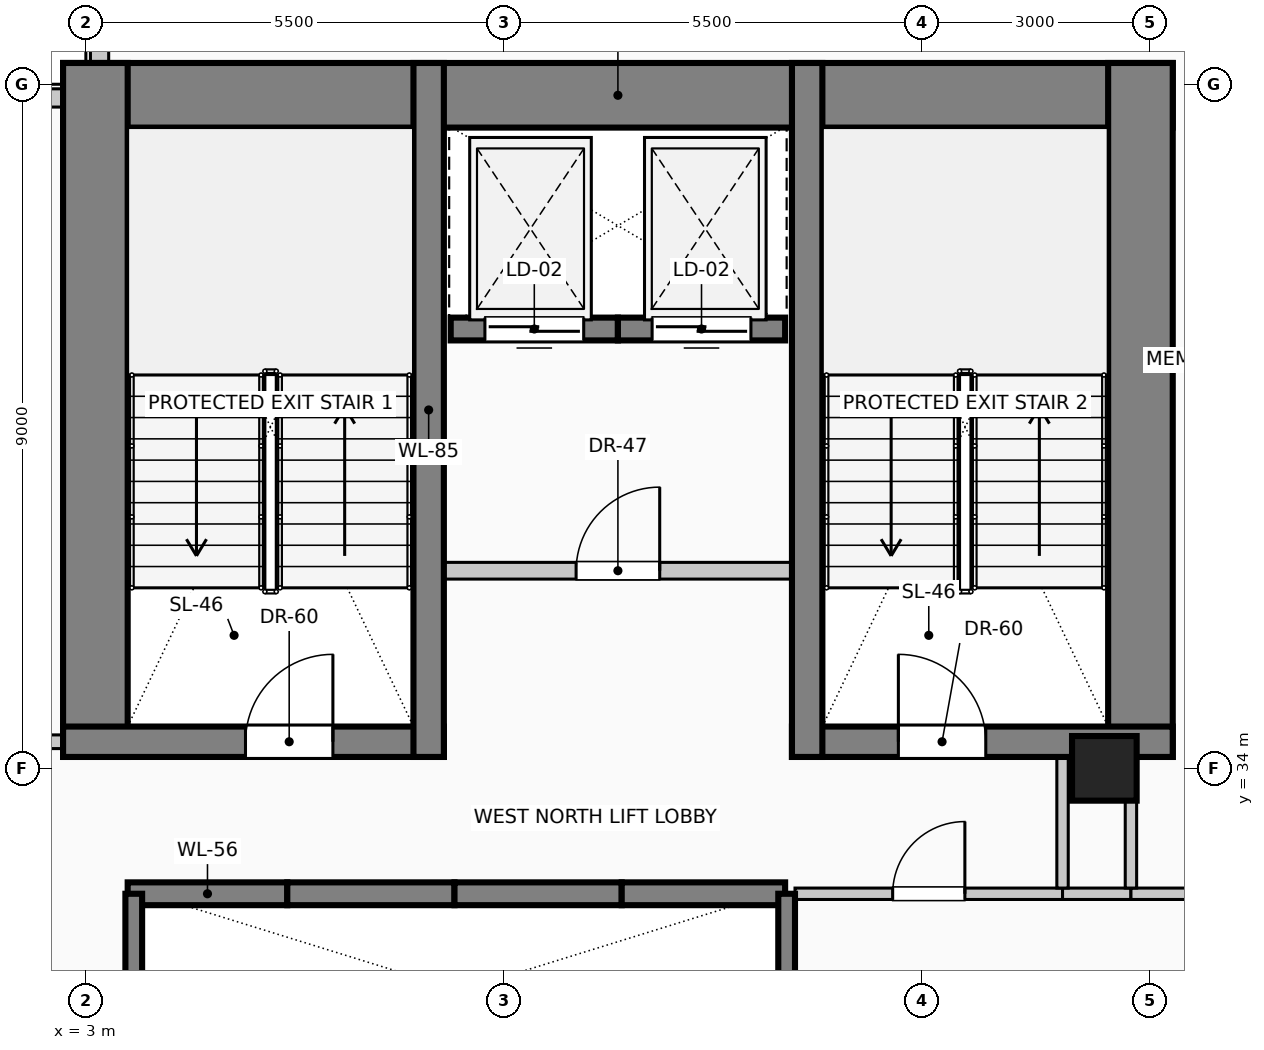
"""IFC4 building model, lengths in metres.
Left out: names, types, materials, properties, quantities, classifications, styles, units other than length and angle.
Written with IfcOpenShell. Run it as: python <this file> out.ifc"""

import sys

from ifc_helpers import new_model, si_unit, direction, frame, frame_2d, origin, origin_2d, place, context, subcontext, project, spatial, rectangle, circle, extrude, element, fill, save


model = new_model("IFC4")
c1 = context("Model", 3, precision=1e-05, world=origin(), true_north=direction((0.0, 1.0)))
c2 = subcontext(c1, "Body", "Model", "MODEL_VIEW")
j1 = project(units=[si_unit("LENGTHUNIT", "METRE"), si_unit("PLANEANGLEUNIT", "RADIAN")], contexts=[c1])
p1 = place(None, origin())
s1 = spatial("IfcSite", under=j1, at=p1, CompositionType="ELEMENT")
p2 = place(p1, origin())
s2 = spatial("IfcBuilding", under=s1, at=p2, CompositionType="ELEMENT")
p3 = place(p2, frame((0.0, 0.0, 178.6)))
s3 = spatial("IfcBuildingStorey", under=s2, at=p3, CompositionType="ELEMENT", Elevation=178.6)
p4 = place(p3, frame((2.7, 42.855, 0.0), z_axis=(0.0, 0.0, 1.0), x_axis=(1.0, 0.0, 0.0)))
e1 = element("IfcWall", 1, at=p4, inside=s3, PredefinedType="SHEAR", context=c2, shape_type="SweptSolid", body=[
    extrude(rectangle(XDim=14.6, YDim=0.85, at=frame_2d((7.3, 0.0))), origin(), (0.0, 0.0, 1.0), 4.0),
])
for number, where, z_axis, x_axis in (
    (2, (3.125, 34.15, 0.0), (0.0, 0.0, 1.0), (0.0, 1.0, 0.0)),
    (3, (16.875, 34.15, 0.0), (0.0, 0.0, 1.0), (0.0, 1.0, 0.0)),
):
    element("IfcWall", number, at=place(p3, frame(where, z_axis=z_axis, x_axis=x_axis)), inside=s3, PredefinedType="SHEAR", context=c2, shape_type="SweptSolid", body=[
        extrude(rectangle(XDim=9.13, YDim=0.85, at=frame_2d((4.565, 0.0))), origin(), (0.0, 0.0, 1.0), 4.0),
    ])
p5 = place(p3, frame((2.7, 34.35, 0.0), z_axis=(0.0, 0.0, 1.0), x_axis=(1.0, 0.0, 0.0)))
e4 = element("IfcWall", 4, at=p5, inside=s3, PredefinedType="SHEAR", context=c2, shape_type="SweptSolid", body=[
    extrude(rectangle(XDim=5.01, YDim=0.4, at=frame_2d((2.505, 0.0))), origin(), (0.0, 0.0, 1.0), 4.0),
])
p6 = place(p5, frame((2.4, 0.0, 0.0)))
e5 = element("IfcOpeningElement", 5, at=p6, cuts=e4, PredefinedType="OPENING", context=c2, shape_type="SweptSolid", body=[
    extrude(rectangle(XDim=1.15, YDim=2.2, at=frame_2d((0.575, 1.1))), frame((0.0, 0.21, 0.0), z_axis=(0.0, -1.0, 0.0), x_axis=(1.0, 0.0, 0.0)), (0.0, 0.0, 1.0), 0.42),
])
p7 = place(p3, frame((12.29, 34.35, 0.0), z_axis=(0.0, 0.0, 1.0), x_axis=(1.0, 0.0, 0.0)))
e6 = element("IfcWall", 6, at=p7, inside=s3, PredefinedType="SHEAR", context=c2, shape_type="SweptSolid", body=[
    extrude(rectangle(XDim=5.01, YDim=0.4, at=frame_2d((2.505, 0.0))), origin(), (0.0, 0.0, 1.0), 4.0),
])
p8 = place(p7, frame((1.4, 0.0, 0.0)))
e7 = element("IfcOpeningElement", 7, at=p8, cuts=e6, PredefinedType="OPENING", context=c2, shape_type="SweptSolid", body=[
    extrude(rectangle(XDim=1.15, YDim=2.2, at=frame_2d((0.575, 1.1))), frame((0.0, 0.21, 0.0), z_axis=(0.0, -1.0, 0.0), x_axis=(1.0, 0.0, 0.0)), (0.0, 0.0, 1.0), 0.42),
])
for number, where, z_axis, x_axis in (
    (8, (7.51, 34.15, 0.0), (0.0, 0.0, 1.0), (0.0, 1.0, 0.0)),
    (9, (12.49, 34.15, 0.0), (0.0, 0.0, 1.0), (0.0, 1.0, 0.0)),
):
    element("IfcWall", number, at=place(p3, frame(where, z_axis=z_axis, x_axis=x_axis)), inside=s3, PredefinedType="SHEAR", context=c2, shape_type="SweptSolid", body=[
        extrude(rectangle(XDim=9.13, YDim=0.4, at=frame_2d((4.565, 0.0))), origin(), (0.0, 0.0, 1.0), 4.0),
    ])
p9 = place(p3, frame((16.4, 34.0, 0.0), z_axis=(0.0, 0.0, 1.0), x_axis=(1.0, 0.0, 0.0)))
e10 = element("IfcColumn", 10, at=p9, inside=s3, PredefinedType="COLUMN", context=c2, shape_type="SweptSolid", body=[
    extrude(circle(Radius=0.425, at=origin_2d()), origin(), (0.0, 0.0, 1.0), 4.0),
])
p10 = place(p3, frame((0.6, 42.82, 0.0), z_axis=(0.0, 0.0, 1.0), x_axis=(1.0, 0.0, 0.0)))
e11 = element("IfcWall", 11, at=p10, inside=s3, PredefinedType="SOLIDWALL", context=c2, shape_type="SweptSolid", body=[
    extrude(rectangle(XDim=2.095, YDim=0.24, at=frame_2d((1.047, 0.0))), origin(), (0.0, 0.0, 1.0), 3.75),
])
p11 = place(p3, frame((3.18, 43.285, 0.0), z_axis=(0.0, 0.0, 1.0), x_axis=(0.0, 1.0, 0.0)))
e12 = element("IfcWall", 12, at=p11, inside=s3, PredefinedType="SOLIDWALL", context=c2, shape_type="SweptSolid", body=[
    extrude(rectangle(XDim=2.115, YDim=0.24, at=frame_2d((1.058, 0.0))), origin(), (0.0, 0.0, 1.0), 3.75),
])
p12 = place(p3, frame((3.55, 32.35, 0.0), z_axis=(0.0, 0.0, 1.0), x_axis=(1.0, 0.0, 0.0)))
e13 = element("IfcWall", 13, at=p12, inside=s3, PredefinedType="SOLIDWALL", context=c2, shape_type="SweptSolid", body=[
    extrude(rectangle(XDim=2.1, YDim=0.3, at=frame_2d((1.05, 0.0))), origin(), (0.0, 0.0, 1.0), 4.0),
])
p13 = place(p3, frame((5.65, 32.35, 0.0), z_axis=(0.0, 0.0, 1.0), x_axis=(1.0, 0.0, 0.0)))
e14 = element("IfcWall", 14, at=p13, inside=s3, PredefinedType="SOLIDWALL", context=c2, shape_type="SweptSolid", body=[
    extrude(rectangle(XDim=2.2, YDim=0.3, at=frame_2d((1.1, 0.0))), origin(), (0.0, 0.0, 1.0), 4.0),
])
p14 = place(p3, frame((7.85, 32.35, 0.0), z_axis=(0.0, 0.0, 1.0), x_axis=(1.0, 0.0, 0.0)))
e15 = element("IfcWall", 15, at=p14, inside=s3, PredefinedType="SOLIDWALL", context=c2, shape_type="SweptSolid", body=[
    extrude(rectangle(XDim=2.2, YDim=0.3, at=frame_2d((1.1, 0.0))), origin(), (0.0, 0.0, 1.0), 4.0),
])
p15 = place(p3, frame((10.05, 32.35, 0.0), z_axis=(0.0, 0.0, 1.0), x_axis=(1.0, 0.0, 0.0)))
e16 = element("IfcWall", 16, at=p15, inside=s3, PredefinedType="SOLIDWALL", context=c2, shape_type="SweptSolid", body=[
    extrude(rectangle(XDim=2.15, YDim=0.3, at=frame_2d((1.075, 0.0))), origin(), (0.0, 0.0, 1.0), 4.0),
])
p16 = place(p3, frame((10.0, 39.78, 0.0), z_axis=(0.0, 0.0, 1.0), x_axis=(-1.0, 0.0, 0.0)))
e17 = element("IfcWall", 17, at=p16, inside=s3, PredefinedType="SOLIDWALL", context=c2, shape_type="SweptSolid", body=[
    extrude(rectangle(XDim=2.2, YDim=0.3, at=frame_2d((1.1, 0.0))), origin(), (0.0, 0.0, 1.0), 4.0),
])
p17 = place(p16, frame((0.45, 0.0, 0.0)))
e18 = element("IfcOpeningElement", 18, at=p17, cuts=e17, PredefinedType="OPENING", context=c2, shape_type="SweptSolid", body=[
    extrude(rectangle(XDim=1.3, YDim=2.25, at=frame_2d((0.65, 1.125))), frame((0.0, 0.16, 0.0), z_axis=(0.0, -1.0, 0.0), x_axis=(1.0, 0.0, 0.0)), (0.0, 0.0, 1.0), 0.32),
])
p18 = place(p3, frame((12.2, 39.78, 0.0), z_axis=(0.0, 0.0, 1.0), x_axis=(-1.0, 0.0, 0.0)))
e19 = element("IfcWall", 19, at=p18, inside=s3, PredefinedType="SOLIDWALL", context=c2, shape_type="SweptSolid", body=[
    extrude(rectangle(XDim=2.2, YDim=0.3, at=frame_2d((1.1, 0.0))), origin(), (0.0, 0.0, 1.0), 4.0),
])
p19 = place(p18, frame((0.45, 0.0, 0.0)))
e20 = element("IfcOpeningElement", 20, at=p19, cuts=e19, PredefinedType="OPENING", context=c2, shape_type="SweptSolid", body=[
    extrude(rectangle(XDim=1.3, YDim=2.25, at=frame_2d((0.65, 1.125))), frame((0.0, 0.16, 0.0), z_axis=(0.0, -1.0, 0.0), x_axis=(1.0, 0.0, 0.0)), (0.0, 0.0, 1.0), 0.32),
])
p20 = place(p3, frame((3.63, 26.8, 0.0), z_axis=(0.0, 0.0, 1.0), x_axis=(0.0, 1.0, 0.0)))
e21 = element("IfcWall", 21, at=p20, inside=s3, PredefinedType="SOLIDWALL", context=c2, shape_type="SweptSolid", body=[
    extrude(rectangle(XDim=5.55, YDim=0.22, at=frame_2d((2.775, 0.0))), origin(), (0.0, 0.0, 1.0), 4.0),
])
p21 = place(p3, frame((12.22, 29.75, 0.0), z_axis=(0.0, 0.0, 1.0), x_axis=(0.0, 1.0, 0.0)))
e22 = element("IfcWall", 22, at=p21, inside=s3, PredefinedType="SOLIDWALL", context=c2, shape_type="SweptSolid", body=[
    extrude(rectangle(XDim=2.6, YDim=0.22, at=frame_2d((1.3, 0.0))), origin(), (0.0, 0.0, 1.0), 4.0),
])
p22 = place(p3, frame((7.51, 36.6, 0.0), z_axis=(0.0, 0.0, 1.0), x_axis=(1.0, 0.0, 0.0)))
e23 = element("IfcWall", 23, at=p22, inside=s3, PredefinedType="PARTITIONING", context=c2, shape_type="SweptSolid", body=[
    extrude(rectangle(XDim=4.98, YDim=0.22, at=frame_2d((2.49, 0.0))), origin(), (0.0, 0.0, 1.0), 3.75),
])
p23 = place(p22, frame((1.94, 0.0, 0.0)))
e24 = element("IfcOpeningElement", 24, at=p23, cuts=e23, PredefinedType="OPENING", context=c2, shape_type="SweptSolid", body=[
    extrude(rectangle(XDim=1.1, YDim=2.2, at=frame_2d((0.55, 1.1))), frame((0.0, 0.12, 0.0), z_axis=(0.0, -1.0, 0.0), x_axis=(1.0, 0.0, 0.0)), (0.0, 0.0, 1.0), 0.24),
])
p24 = place(p3, frame((12.33, 32.35, 0.0), z_axis=(0.0, 0.0, 1.0), x_axis=(1.0, 0.0, 0.0)))
e25 = element("IfcWall", 25, at=p24, inside=s3, PredefinedType="PARTITIONING", context=c2, shape_type="SweptSolid", body=[
    extrude(rectangle(XDim=3.52, YDim=0.15, at=frame_2d((1.76, 0.0))), origin(), (0.0, 0.0, 1.0), 3.75),
])
p25 = place(p24, frame((1.285, 0.0, 0.0)))
e26 = element("IfcOpeningElement", 26, at=p25, cuts=e25, PredefinedType="OPENING", context=c2, shape_type="SweptSolid", body=[
    extrude(rectangle(XDim=0.95, YDim=2.15, at=frame_2d((0.475, 1.075))), frame((0.0, 0.085, 0.0), z_axis=(0.0, -1.0, 0.0), x_axis=(1.0, 0.0, 0.0)), (0.0, 0.0, 1.0), 0.17),
])
p26 = place(p3, frame((15.85, 32.35, 0.0), z_axis=(0.0, 0.0, 1.0), x_axis=(1.0, 0.0, 0.0)))
e27 = element("IfcWall", 27, at=p26, inside=s3, PredefinedType="PARTITIONING", context=c2, shape_type="SweptSolid", body=[
    extrude(rectangle(XDim=0.9, YDim=0.15, at=frame_2d((0.45, 0.0))), origin(), (0.0, 0.0, 1.0), 3.75),
])
p27 = place(p3, frame((16.75, 32.35, 0.0), z_axis=(0.0, 0.0, 1.0), x_axis=(1.0, 0.0, 0.0)))
e28 = element("IfcWall", 28, at=p27, inside=s3, PredefinedType="PARTITIONING", context=c2, shape_type="SweptSolid", body=[
    extrude(rectangle(XDim=4.25, YDim=0.15, at=frame_2d((2.125, 0.0))), origin(), (0.0, 0.0, 1.0), 3.75),
])
p28 = place(p3, frame((1.15, 34.35, 0.0), z_axis=(0.0, 0.0, 1.0), x_axis=(1.0, 0.0, 0.0)))
e29 = element("IfcWall", 29, at=p28, inside=s3, PredefinedType="PARTITIONING", context=c2, shape_type="SweptSolid", body=[
    extrude(rectangle(XDim=1.55, YDim=0.18, at=frame_2d((0.775, 0.0))), origin(), (0.0, 0.0, 1.0), 3.75),
])
p29 = place(p3, frame((15.85, 32.425, 0.0), z_axis=(0.0, 0.0, 1.0), x_axis=(0.0, 1.0, 0.0)))
e30 = element("IfcWall", 30, at=p29, inside=s3, PredefinedType="PARTITIONING", context=c2, shape_type="SweptSolid", body=[
    extrude(rectangle(XDim=1.725, YDim=0.15, at=frame_2d((0.862, 0.0))), origin(), (0.0, 0.0, 1.0), 3.75),
])
p30 = place(p3, frame((16.75, 32.425, 0.0), z_axis=(0.0, 0.0, 1.0), x_axis=(0.0, 1.0, 0.0)))
e31 = element("IfcWall", 31, at=p30, inside=s3, PredefinedType="PARTITIONING", context=c2, shape_type="SweptSolid", body=[
    extrude(rectangle(XDim=1.15, YDim=0.15, at=frame_2d((0.575, 0.0))), origin(), (0.0, 0.0, 1.0), 3.75),
])
p31 = place(p17, origin())
e32 = element("IfcDoor", 32, at=p31, inside=s3, OperationType="SLIDING_TO_LEFT", PredefinedType="DOOR", context=c2, shape_type="SweptSolid", body=[
    extrude(rectangle(XDim=1.3, YDim=2.25, at=frame_2d((0.65, 1.125))), frame((0.0, 0.025, 0.0), z_axis=(0.0, -1.0, 0.0), x_axis=(1.0, 0.0, 0.0)), (0.0, 0.0, 1.0), 0.05),
])
fill(e18, e32)
p32 = place(p19, origin())
e33 = element("IfcDoor", 33, at=p32, inside=s3, OperationType="SLIDING_TO_RIGHT", PredefinedType="DOOR", context=c2, shape_type="SweptSolid", body=[
    extrude(rectangle(XDim=1.3, YDim=2.25, at=frame_2d((0.65, 1.125))), frame((0.0, 0.025, 0.0), z_axis=(0.0, -1.0, 0.0), x_axis=(1.0, 0.0, 0.0)), (0.0, 0.0, 1.0), 0.05),
])
fill(e20, e33)
p33 = place(p6, origin())
e34 = element("IfcDoor", 34, at=p33, inside=s3, OperationType="SINGLE_SWING_RIGHT", PredefinedType="DOOR", context=c2, shape_type="SweptSolid", body=[
    extrude(rectangle(XDim=1.15, YDim=2.2, at=frame_2d((0.575, 1.1))), frame((0.0, 0.025, 0.0), z_axis=(0.0, -1.0, 0.0), x_axis=(1.0, 0.0, 0.0)), (0.0, 0.0, 1.0), 0.05),
])
fill(e5, e34)
p34 = place(p8, origin())
e35 = element("IfcDoor", 35, at=p34, inside=s3, OperationType="SINGLE_SWING_LEFT", PredefinedType="DOOR", context=c2, shape_type="SweptSolid", body=[
    extrude(rectangle(XDim=1.15, YDim=2.2, at=frame_2d((0.575, 1.1))), frame((0.0, 0.025, 0.0), z_axis=(0.0, -1.0, 0.0), x_axis=(1.0, 0.0, 0.0)), (0.0, 0.0, 1.0), 0.05),
])
fill(e7, e35)
p35 = place(p23, origin())
e36 = element("IfcDoor", 36, at=p35, inside=s3, OperationType="SINGLE_SWING_RIGHT", PredefinedType="DOOR", context=c2, shape_type="SweptSolid", body=[
    extrude(rectangle(XDim=1.1, YDim=2.2, at=frame_2d((0.55, 1.1))), frame((0.0, 0.025, 0.0), z_axis=(0.0, -1.0, 0.0), x_axis=(1.0, 0.0, 0.0)), (0.0, 0.0, 1.0), 0.05),
])
fill(e24, e36)
p36 = place(p25, origin())
e37 = element("IfcDoor", 37, at=p36, inside=s3, OperationType="SINGLE_SWING_RIGHT", PredefinedType="DOOR", context=c2, shape_type="SweptSolid", body=[
    extrude(rectangle(XDim=0.95, YDim=2.15, at=frame_2d((0.475, 1.075))), frame((0.0, 0.025, 0.0), z_axis=(0.0, -1.0, 0.0), x_axis=(1.0, 0.0, 0.0)), (0.0, 0.0, 1.0), 0.05),
])
fill(e26, e37)
save(model, sys.argv[1])
